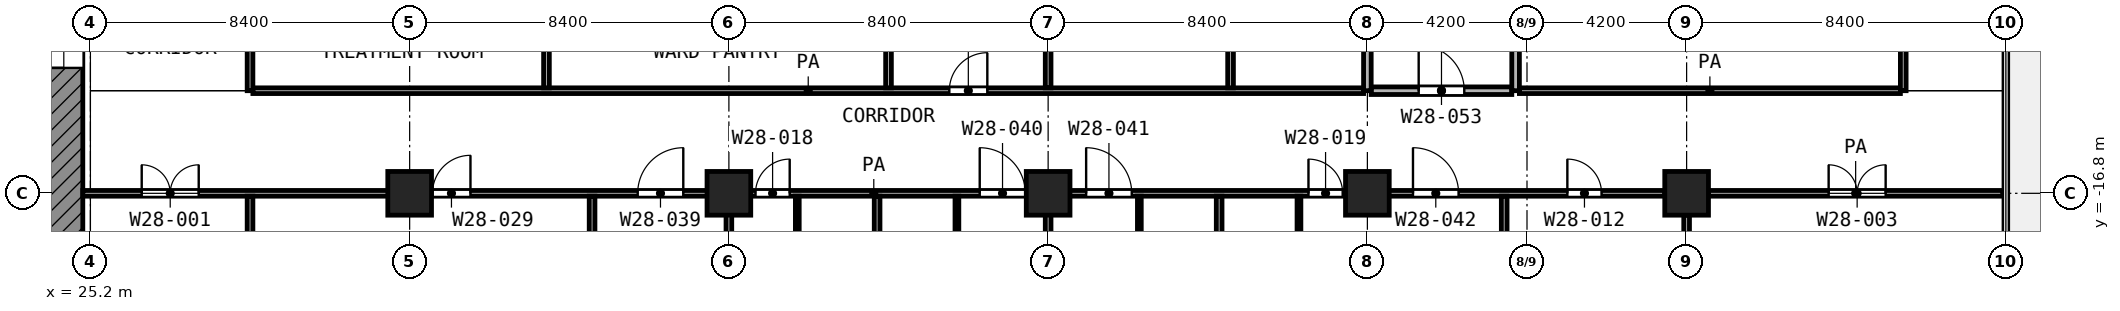
"""IFC4 building model, lengths in metres.
Left out: names, types, materials, properties, quantities, classifications, styles, units other than length and angle.
Written with IfcOpenShell. Run it as: python <this file> out.ifc"""

import sys

from ifc_helpers import new_model, si_unit, direction, frame, frame_2d, origin, origin_2d, place, context, subcontext, project, spatial, rectangle, extrude, element, fill, save


model = new_model("IFC4")
c1 = context("Model", 3, precision=1e-05, world=origin(), true_north=direction((0.0, 1.0)))
c2 = subcontext(c1, "Body", "Model", "MODEL_VIEW")
j1 = project(units=[si_unit("LENGTHUNIT", "METRE"), si_unit("PLANEANGLEUNIT", "RADIAN")], contexts=[c1])
p1 = place(None, origin())
s1 = spatial("IfcSite", under=j1, at=p1, CompositionType="ELEMENT")
p2 = place(p1, origin())
s2 = spatial("IfcBuilding", under=s1, at=p2, CompositionType="ELEMENT")
p3 = place(p2, frame((0.0, 0.0, 145.0)))
s3 = spatial("IfcBuildingStorey", under=s2, at=p3, CompositionType="ELEMENT", Elevation=145.0)
for number, where, z_axis, x_axis in (
    (1, (33.6, -16.8, 0.0), (0.0, 0.0, 1.0), (1.0, 0.0, 0.0)),
    (2, (42.0, -16.8, 0.0), (0.0, 0.0, 1.0), (1.0, 0.0, 0.0)),
    (3, (50.4, -16.8, 0.0), (0.0, 0.0, 1.0), (1.0, 0.0, 0.0)),
    (4, (58.8, -16.8, 0.0), (0.0, 0.0, 1.0), (1.0, 0.0, 0.0)),
    (5, (67.2, -16.8, 0.0), (0.0, 0.0, 1.0), (1.0, 0.0, 0.0)),
):
    element("IfcColumn", number, at=place(p3, frame(where, z_axis=z_axis, x_axis=x_axis)), inside=s3, PredefinedType="COLUMN", context=c2, shape_type="SweptSolid", body=[
        extrude(rectangle(XDim=1.15, YDim=1.15, at=origin_2d()), origin(), (0.0, 0.0, 1.0), 4.2),
    ])
p4 = place(p3, frame((24.5, -24.0, 0.0), z_axis=(0.0, 0.0, 1.0), x_axis=(0.0, 1.0, 0.0)))
e6 = element("IfcWall", 6, at=p4, inside=s3, PredefinedType="SHEAR", context=c2, shape_type="SweptSolid", body=[
    extrude(rectangle(XDim=18.6, YDim=1.0, at=frame_2d((9.3, 0.0))), origin(), (0.0, 0.0, 1.0), 3.6),
])
p5 = place(p4, frame((10.5, 0.0, 0.0)))
e7 = element("IfcOpeningElement", 7, at=p5, cuts=e6, PredefinedType="OPENING", context=c2, shape_type="SweptSolid", body=[
    extrude(rectangle(XDim=1.8, YDim=2.1, at=frame_2d((0.9, 1.05))), frame((0.0, 0.51, 0.0), z_axis=(0.0, -1.0, 0.0), x_axis=(1.0, 0.0, 0.0)), (0.0, 0.0, 1.0), 1.02),
])
for number, where, z_axis, x_axis in (
    (8, (43.8, -19.5, 0.0), (0.0, 0.0, 1.0), (0.0, 1.0, 0.0)),
    (9, (48.0, -19.5, 0.0), (0.0, 0.0, 1.0), (0.0, 1.0, 0.0)),
    (10, (52.8, -19.5, 0.0), (0.0, 0.0, 1.0), (0.0, 1.0, 0.0)),
):
    element("IfcWall", number, at=place(p3, frame(where, z_axis=z_axis, x_axis=x_axis)), inside=s3, PredefinedType="PARTITIONING", context=c2, shape_type="SweptSolid", body=[
        extrude(rectangle(XDim=2.625, YDim=0.1, at=frame_2d((1.312, 0.0))), origin(), (0.0, 0.0, 1.0), 3.6),
    ])
p6 = place(p3, frame((57.0, -19.499, 0.0), z_axis=(0.0, 0.0, 1.0), x_axis=(0.0, 1.0, 0.0)))
e11 = element("IfcWall", 11, at=p6, inside=s3, PredefinedType="PARTITIONING", context=c2, shape_type="SweptSolid", body=[
    extrude(rectangle(XDim=2.624, YDim=0.1, at=frame_2d((1.312, 0.0))), origin(), (0.0, 0.0, 1.0), 3.6),
])
p7 = place(p3, frame((25.0, -16.8, 0.0), z_axis=(0.0, 0.0, 1.0), x_axis=(1.0, 0.0, 0.0)))
e12 = element("IfcWall", 12, at=p7, inside=s3, PredefinedType="PARTITIONING", context=c2, shape_type="SweptSolid", body=[
    extrude(rectangle(XDim=41.625, YDim=0.15, at=frame_2d((20.812, 0.0))), origin(), (0.0, 0.0, 1.0), 3.6),
])
p8 = place(p7, frame((1.55, 0.0, 0.0)))
e13 = element("IfcOpeningElement", 13, at=p8, cuts=e12, PredefinedType="OPENING", context=c2, shape_type="SweptSolid", body=[
    extrude(rectangle(XDim=1.5, YDim=2.1, at=frame_2d((0.75, 1.05))), frame((0.0, 0.085, 0.0), z_axis=(0.0, -1.0, 0.0), x_axis=(1.0, 0.0, 0.0)), (0.0, 0.0, 1.0), 0.17),
])
p9 = place(p7, frame((9.2, 0.0, 0.0)))
e14 = element("IfcOpeningElement", 14, at=p9, cuts=e12, PredefinedType="OPENING", context=c2, shape_type="SweptSolid", body=[
    extrude(rectangle(XDim=1.0, YDim=2.1, at=frame_2d((0.5, 1.05))), frame((0.0, 0.085, 0.0), z_axis=(0.0, -1.0, 0.0), x_axis=(1.0, 0.0, 0.0)), (0.0, 0.0, 1.0), 0.17),
])
p10 = place(p7, frame((14.6, 0.0, 0.0)))
e15 = element("IfcOpeningElement", 15, at=p10, cuts=e12, PredefinedType="OPENING", context=c2, shape_type="SweptSolid", body=[
    extrude(rectangle(XDim=1.2, YDim=2.1, at=frame_2d((0.6, 1.05))), frame((0.0, 0.085, 0.0), z_axis=(0.0, -1.0, 0.0), x_axis=(1.0, 0.0, 0.0)), (0.0, 0.0, 1.0), 0.17),
])
p11 = place(p7, frame((17.7, 0.0, 0.0)))
e16 = element("IfcOpeningElement", 16, at=p11, cuts=e12, PredefinedType="OPENING", context=c2, shape_type="SweptSolid", body=[
    extrude(rectangle(XDim=0.9, YDim=2.1, at=frame_2d((0.45, 1.05))), frame((0.0, 0.085, 0.0), z_axis=(0.0, -1.0, 0.0), x_axis=(1.0, 0.0, 0.0)), (0.0, 0.0, 1.0), 0.17),
])
p12 = place(p7, frame((23.6, 0.0, 0.0)))
e17 = element("IfcOpeningElement", 17, at=p12, cuts=e12, PredefinedType="OPENING", context=c2, shape_type="SweptSolid", body=[
    extrude(rectangle(XDim=1.2, YDim=2.1, at=frame_2d((0.6, 1.05))), frame((0.0, 0.085, 0.0), z_axis=(0.0, -1.0, 0.0), x_axis=(1.0, 0.0, 0.0)), (0.0, 0.0, 1.0), 0.17),
])
p13 = place(p7, frame((26.4, 0.0, 0.0)))
e18 = element("IfcOpeningElement", 18, at=p13, cuts=e12, PredefinedType="OPENING", context=c2, shape_type="SweptSolid", body=[
    extrude(rectangle(XDim=1.2, YDim=2.1, at=frame_2d((0.6, 1.05))), frame((0.0, 0.085, 0.0), z_axis=(0.0, -1.0, 0.0), x_axis=(1.0, 0.0, 0.0)), (0.0, 0.0, 1.0), 0.17),
])
p14 = place(p7, frame((35.0, 0.0, 0.0)))
e19 = element("IfcOpeningElement", 19, at=p14, cuts=e12, PredefinedType="OPENING", context=c2, shape_type="SweptSolid", body=[
    extrude(rectangle(XDim=1.2, YDim=2.1, at=frame_2d((0.6, 1.05))), frame((0.0, 0.085, 0.0), z_axis=(0.0, -1.0, 0.0), x_axis=(1.0, 0.0, 0.0)), (0.0, 0.0, 1.0), 0.17),
])
p15 = place(p7, frame((32.25, 0.0, 0.0)))
e20 = element("IfcOpeningElement", 20, at=p15, cuts=e12, PredefinedType="OPENING", context=c2, shape_type="SweptSolid", body=[
    extrude(rectangle(XDim=0.9, YDim=2.1, at=frame_2d((0.45, 1.05))), frame((0.0, 0.085, 0.0), z_axis=(0.0, -1.0, 0.0), x_axis=(1.0, 0.0, 0.0)), (0.0, 0.0, 1.0), 0.17),
])
p16 = place(p7, frame((39.062, 0.0, 0.0)))
e21 = element("IfcOpeningElement", 21, at=p16, cuts=e12, PredefinedType="OPENING", context=c2, shape_type="SweptSolid", body=[
    extrude(rectangle(XDim=0.9, YDim=2.1, at=frame_2d((0.45, 1.05))), frame((0.0, 0.085, 0.0), z_axis=(0.0, -1.0, 0.0), x_axis=(1.0, 0.0, 0.0)), (0.0, 0.0, 1.0), 0.17),
])
p17 = place(p3, frame((67.775, -16.8, 0.0), z_axis=(0.0, 0.0, 1.0), x_axis=(1.0, 0.0, 0.0)))
e22 = element("IfcWall", 22, at=p17, inside=s3, PredefinedType="PARTITIONING", context=c2, shape_type="SweptSolid", body=[
    extrude(rectangle(XDim=7.745, YDim=0.15, at=frame_2d((3.873, 0.0))), origin(), (0.0, 0.0, 1.0), 3.6),
])
p18 = place(p17, frame((3.162, 0.0, 0.0)))
e23 = element("IfcOpeningElement", 23, at=p18, cuts=e22, PredefinedType="OPENING", context=c2, shape_type="SweptSolid", body=[
    extrude(rectangle(XDim=1.5, YDim=2.1, at=frame_2d((0.75, 1.05))), frame((0.0, 0.085, 0.0), z_axis=(0.0, -1.0, 0.0), x_axis=(1.0, 0.0, 0.0)), (0.0, 0.0, 1.0), 0.17),
])
p19 = place(p3, frame((29.475, -14.1, 0.0), z_axis=(0.0, 0.0, 1.0), x_axis=(1.0, 0.0, 0.0)))
e24 = element("IfcWall", 24, at=p19, inside=s3, PredefinedType="PARTITIONING", context=c2, shape_type="SweptSolid", body=[
    extrude(rectangle(XDim=29.225, YDim=0.15, at=frame_2d((14.612, 0.0))), origin(), (0.0, 0.0, 1.0), 3.6),
])
p20 = place(p19, frame((18.325, 0.0, 0.0)))
e25 = element("IfcOpeningElement", 25, at=p20, cuts=e24, PredefinedType="OPENING", context=c2, shape_type="SweptSolid", body=[
    extrude(rectangle(XDim=1.0, YDim=2.1, at=frame_2d((0.5, 1.05))), frame((0.0, 0.085, 0.0), z_axis=(0.0, -1.0, 0.0), x_axis=(1.0, 0.0, 0.0)), (0.0, 0.0, 1.0), 0.17),
])
p21 = place(p3, frame((62.8, -14.1, 0.0), z_axis=(0.0, 0.0, 1.0), x_axis=(1.0, 0.0, 0.0)))
e26 = element("IfcWall", 26, at=p21, inside=s3, PredefinedType="PARTITIONING", context=c2, shape_type="SweptSolid", body=[
    extrude(rectangle(XDim=10.025, YDim=0.15, at=frame_2d((5.012, 0.0))), origin(), (0.0, 0.0, 1.0), 3.6),
])
p22 = place(p3, frame((29.4, -25.2, 0.0), z_axis=(0.0, 0.0, 1.0), x_axis=(0.0, 1.0, 0.0)))
e27 = element("IfcWall", 27, at=p22, inside=s3, PredefinedType="PARTITIONING", context=c2, shape_type="SweptSolid", body=[
    extrude(rectangle(XDim=8.325, YDim=0.15, at=frame_2d((4.163, 0.0))), origin(), (0.0, 0.0, 1.0), 3.6),
])
p23 = place(p3, frame((29.4, -14.1, 0.0), z_axis=(0.0, 0.0, 1.0), x_axis=(0.0, 1.0, 0.0)))
e28 = element("IfcWall", 28, at=p23, inside=s3, PredefinedType="PARTITIONING", context=c2, shape_type="SweptSolid", body=[
    extrude(rectangle(XDim=3.0, YDim=0.15, at=frame_2d((1.5, 0.0))), origin(), (0.0, 0.0, 1.0), 3.6),
])
p24 = place(p3, frame((37.2, -14.025, 0.0), z_axis=(0.0, 0.0, 1.0), x_axis=(0.0, 1.0, 0.0)))
e29 = element("IfcWall", 29, at=p24, inside=s3, PredefinedType="PARTITIONING", context=c2, shape_type="SweptSolid", body=[
    extrude(rectangle(XDim=2.85, YDim=0.15, at=frame_2d((1.425, 0.0))), origin(), (0.0, 0.0, 1.0), 3.6),
])
p25 = place(p3, frame((38.4, -25.12, 0.0), z_axis=(0.0, 0.0, 1.0), x_axis=(0.0, 1.0, 0.0)))
e30 = element("IfcWall", 30, at=p25, inside=s3, PredefinedType="PARTITIONING", context=c2, shape_type="SweptSolid", body=[
    extrude(rectangle(XDim=8.245, YDim=0.15, at=frame_2d((4.123, 0.0))), origin(), (0.0, 0.0, 1.0), 2.7),
])
p26 = place(p3, frame((42.0, -25.12, 0.0), z_axis=(0.0, 0.0, 1.0), x_axis=(0.0, 1.0, 0.0)))
e31 = element("IfcWall", 31, at=p26, inside=s3, PredefinedType="PARTITIONING", context=c2, shape_type="SweptSolid", body=[
    extrude(rectangle(XDim=8.245, YDim=0.15, at=frame_2d((4.123, 0.0))), origin(), (0.0, 0.0, 1.0), 3.6),
])
p27 = place(p3, frame((45.9, -25.12, 0.0), z_axis=(0.0, 0.0, 1.0), x_axis=(0.0, 1.0, 0.0)))
e32 = element("IfcWall", 32, at=p27, inside=s3, PredefinedType="PARTITIONING", context=c2, shape_type="SweptSolid", body=[
    extrude(rectangle(XDim=8.245, YDim=0.15, at=frame_2d((4.123, 0.0))), origin(), (0.0, 0.0, 1.0), 2.7),
])
p28 = place(p3, frame((46.2, -14.025, 0.0), z_axis=(0.0, 0.0, 1.0), x_axis=(0.0, 1.0, 0.0)))
e33 = element("IfcWall", 33, at=p28, inside=s3, PredefinedType="PARTITIONING", context=c2, shape_type="SweptSolid", body=[
    extrude(rectangle(XDim=2.85, YDim=0.15, at=frame_2d((1.425, 0.0))), origin(), (0.0, 0.0, 1.0), 3.6),
])
p29 = place(p3, frame((50.4, -25.12, 0.0), z_axis=(0.0, 0.0, 1.0), x_axis=(0.0, 1.0, 0.0)))
e34 = element("IfcWall", 34, at=p29, inside=s3, PredefinedType="PARTITIONING", context=c2, shape_type="SweptSolid", body=[
    extrude(rectangle(XDim=8.245, YDim=0.15, at=frame_2d((4.123, 0.0))), origin(), (0.0, 0.0, 1.0), 3.6),
])
p30 = place(p3, frame((50.4, -14.025, 0.0), z_axis=(0.0, 0.0, 1.0), x_axis=(0.0, 1.0, 0.0)))
e35 = element("IfcWall", 35, at=p30, inside=s3, PredefinedType="PARTITIONING", context=c2, shape_type="SweptSolid", body=[
    extrude(rectangle(XDim=2.85, YDim=0.15, at=frame_2d((1.425, 0.0))), origin(), (0.0, 0.0, 1.0), 3.6),
])
p31 = place(p3, frame((54.9, -25.12, 0.0), z_axis=(0.0, 0.0, 1.0), x_axis=(0.0, 1.0, 0.0)))
e36 = element("IfcWall", 36, at=p31, inside=s3, PredefinedType="PARTITIONING", context=c2, shape_type="SweptSolid", body=[
    extrude(rectangle(XDim=8.245, YDim=0.15, at=frame_2d((4.123, 0.0))), origin(), (0.0, 0.0, 1.0), 2.7),
])
p32 = place(p3, frame((55.2, -14.025, 0.0), z_axis=(0.0, 0.0, 1.0), x_axis=(0.0, 1.0, 0.0)))
e37 = element("IfcWall", 37, at=p32, inside=s3, PredefinedType="PARTITIONING", context=c2, shape_type="SweptSolid", body=[
    extrude(rectangle(XDim=2.85, YDim=0.15, at=frame_2d((1.425, 0.0))), origin(), (0.0, 0.0, 1.0), 3.6),
])
p33 = place(p3, frame((62.4, -25.12, 0.0), z_axis=(0.0, 0.0, 1.0), x_axis=(0.0, 1.0, 0.0)))
e38 = element("IfcWall", 38, at=p33, inside=s3, PredefinedType="PARTITIONING", context=c2, shape_type="SweptSolid", body=[
    extrude(rectangle(XDim=8.245, YDim=0.15, at=frame_2d((4.123, 0.0))), origin(), (0.0, 0.0, 1.0), 2.7),
])
p34 = place(p3, frame((67.2, -25.12, 0.0), z_axis=(0.0, 0.0, 1.0), x_axis=(0.0, 1.0, 0.0)))
e39 = element("IfcWall", 39, at=p34, inside=s3, PredefinedType="PARTITIONING", context=c2, shape_type="SweptSolid", body=[
    extrude(rectangle(XDim=7.745, YDim=0.15, at=frame_2d((3.873, 0.0))), origin(), (0.0, 0.0, 1.0), 2.7),
])
p35 = place(p3, frame((72.9, -14.1, 0.0), z_axis=(0.0, 0.0, 1.0), x_axis=(0.0, 1.0, 0.0)))
e40 = element("IfcWall", 40, at=p35, inside=s3, PredefinedType="PARTITIONING", context=c2, shape_type="SweptSolid", body=[
    extrude(rectangle(XDim=3.0, YDim=0.15, at=frame_2d((1.5, 0.0))), origin(), (0.0, 0.0, 1.0), 3.6),
])
p36 = place(p3, frame((58.9, -14.1, 0.0), z_axis=(0.0, 0.0, 1.0), x_axis=(1.0, 0.0, 0.0)))
e41 = element("IfcWall", 41, at=p36, inside=s3, PredefinedType="PARTITIONING", context=c2, shape_type="SweptSolid", body=[
    extrude(rectangle(XDim=3.7, YDim=0.2, at=frame_2d((1.85, 0.0))), origin(), (0.0, 0.0, 1.0), 3.6),
])
p37 = place(p36, frame((1.25, 0.0, 0.0)))
e42 = element("IfcOpeningElement", 42, at=p37, cuts=e41, PredefinedType="OPENING", context=c2, shape_type="SweptSolid", body=[
    extrude(rectangle(XDim=1.2, YDim=2.1, at=frame_2d((0.6, 1.05))), frame((0.0, 0.11, 0.0), z_axis=(0.0, -1.0, 0.0), x_axis=(1.0, 0.0, 0.0)), (0.0, 0.0, 1.0), 0.22),
])
for number, where, z_axis, x_axis in (
    (43, (58.8, -14.1, 0.0), (0.0, 0.0, 1.0), (0.0, 1.0, 0.0)),
    (44, (62.7, -14.1, 0.0), (0.0, 0.0, 1.0), (0.0, 1.0, 0.0)),
):
    element("IfcWall", number, at=place(p3, frame(where, z_axis=z_axis, x_axis=x_axis)), inside=s3, PredefinedType="PARTITIONING", context=c2, shape_type="SweptSolid", body=[
        extrude(rectangle(XDim=3.0, YDim=0.2, at=frame_2d((1.5, 0.0))), origin(), (0.0, 0.0, 1.0), 3.6),
    ])
p38 = place(p5, origin())
e45 = element("IfcDoor", 45, at=p38, inside=s3, OperationType="DOUBLE_DOOR_SINGLE_SWING", PredefinedType="DOOR", context=c2, shape_type="SweptSolid", body=[
    extrude(rectangle(XDim=1.8, YDim=2.1, at=frame_2d((0.9, 1.05))), frame((0.0, 0.025, 0.0), z_axis=(0.0, -1.0, 0.0), x_axis=(1.0, 0.0, 0.0)), (0.0, 0.0, 1.0), 0.05),
])
fill(e7, e45)
p39 = place(p8, origin())
e46 = element("IfcDoor", 46, at=p39, inside=s3, OperationType="DOUBLE_DOOR_SINGLE_SWING", PredefinedType="DOOR", context=c2, shape_type="SweptSolid", body=[
    extrude(rectangle(XDim=1.5, YDim=2.1, at=frame_2d((0.75, 1.05))), frame((0.0, 0.025, 0.0), z_axis=(0.0, -1.0, 0.0), x_axis=(1.0, 0.0, 0.0)), (0.0, 0.0, 1.0), 0.05),
])
fill(e13, e46)
p40 = place(p20, origin())
e47 = element("IfcDoor", 47, at=p40, inside=s3, OperationType="SINGLE_SWING_RIGHT", PredefinedType="DOOR", context=c2, shape_type="SweptSolid", body=[
    extrude(rectangle(XDim=1.0, YDim=2.1, at=frame_2d((0.5, 1.05))), frame((0.0, 0.025, 0.0), z_axis=(0.0, -1.0, 0.0), x_axis=(1.0, 0.0, 0.0)), (0.0, 0.0, 1.0), 0.05),
])
fill(e25, e47)
p41 = place(p37, origin())
e48 = element("IfcDoor", 48, at=p41, inside=s3, OperationType="SINGLE_SWING_LEFT", PredefinedType="DOOR", context=c2, shape_type="SweptSolid", body=[
    extrude(rectangle(XDim=1.2, YDim=2.1, at=frame_2d((0.6, 1.05))), frame((0.0, 0.025, 0.0), z_axis=(0.0, -1.0, 0.0), x_axis=(1.0, 0.0, 0.0)), (0.0, 0.0, 1.0), 0.05),
])
fill(e42, e48)
p42 = place(p9, origin())
e49 = element("IfcDoor", 49, at=p42, inside=s3, OperationType="SINGLE_SWING_RIGHT", PredefinedType="DOOR", context=c2, shape_type="SweptSolid", body=[
    extrude(rectangle(XDim=1.0, YDim=2.1, at=frame_2d((0.5, 1.05))), frame((0.0, 0.025, 0.0), z_axis=(0.0, -1.0, 0.0), x_axis=(1.0, 0.0, 0.0)), (0.0, 0.0, 1.0), 0.05),
])
fill(e14, e49)
p43 = place(p10, origin())
e50 = element("IfcDoor", 50, at=p43, inside=s3, OperationType="SINGLE_SWING_RIGHT", PredefinedType="DOOR", context=c2, shape_type="SweptSolid", body=[
    extrude(rectangle(XDim=1.2, YDim=2.1, at=frame_2d((0.6, 1.05))), frame((0.0, 0.025, 0.0), z_axis=(0.0, -1.0, 0.0), x_axis=(1.0, 0.0, 0.0)), (0.0, 0.0, 1.0), 0.05),
])
fill(e15, e50)
p44 = place(p11, origin())
e51 = element("IfcDoor", 51, at=p44, inside=s3, OperationType="SINGLE_SWING_RIGHT", PredefinedType="DOOR", context=c2, shape_type="SweptSolid", body=[
    extrude(rectangle(XDim=0.9, YDim=2.1, at=frame_2d((0.45, 1.05))), frame((0.0, 0.025, 0.0), z_axis=(0.0, -1.0, 0.0), x_axis=(1.0, 0.0, 0.0)), (0.0, 0.0, 1.0), 0.05),
])
fill(e16, e51)
p45 = place(p12, origin())
e52 = element("IfcDoor", 52, at=p45, inside=s3, OperationType="SINGLE_SWING_LEFT", PredefinedType="DOOR", context=c2, shape_type="SweptSolid", body=[
    extrude(rectangle(XDim=1.2, YDim=2.1, at=frame_2d((0.6, 1.05))), frame((0.0, 0.025, 0.0), z_axis=(0.0, -1.0, 0.0), x_axis=(1.0, 0.0, 0.0)), (0.0, 0.0, 1.0), 0.05),
])
fill(e17, e52)
p46 = place(p13, origin())
e53 = element("IfcDoor", 53, at=p46, inside=s3, OperationType="SINGLE_SWING_LEFT", PredefinedType="DOOR", context=c2, shape_type="SweptSolid", body=[
    extrude(rectangle(XDim=1.2, YDim=2.1, at=frame_2d((0.6, 1.05))), frame((0.0, 0.025, 0.0), z_axis=(0.0, -1.0, 0.0), x_axis=(1.0, 0.0, 0.0)), (0.0, 0.0, 1.0), 0.05),
])
fill(e18, e53)
p47 = place(p14, origin())
e54 = element("IfcDoor", 54, at=p47, inside=s3, OperationType="SINGLE_SWING_LEFT", PredefinedType="DOOR", context=c2, shape_type="SweptSolid", body=[
    extrude(rectangle(XDim=1.2, YDim=2.1, at=frame_2d((0.6, 1.05))), frame((0.0, 0.025, 0.0), z_axis=(0.0, -1.0, 0.0), x_axis=(1.0, 0.0, 0.0)), (0.0, 0.0, 1.0), 0.05),
])
fill(e19, e54)
p48 = place(p15, origin())
e55 = element("IfcDoor", 55, at=p48, inside=s3, OperationType="SINGLE_SWING_LEFT", PredefinedType="DOOR", context=c2, shape_type="SweptSolid", body=[
    extrude(rectangle(XDim=0.9, YDim=2.1, at=frame_2d((0.45, 1.05))), frame((0.0, 0.025, 0.0), z_axis=(0.0, -1.0, 0.0), x_axis=(1.0, 0.0, 0.0)), (0.0, 0.0, 1.0), 0.05),
])
fill(e20, e55)
p49 = place(p16, origin())
e56 = element("IfcDoor", 56, at=p49, inside=s3, OperationType="SINGLE_SWING_LEFT", PredefinedType="DOOR", context=c2, shape_type="SweptSolid", body=[
    extrude(rectangle(XDim=0.9, YDim=2.1, at=frame_2d((0.45, 1.05))), frame((0.0, 0.025, 0.0), z_axis=(0.0, -1.0, 0.0), x_axis=(1.0, 0.0, 0.0)), (0.0, 0.0, 1.0), 0.05),
])
fill(e21, e56)
p50 = place(p18, origin())
e57 = element("IfcDoor", 57, at=p50, inside=s3, OperationType="DOUBLE_DOOR_SINGLE_SWING", PredefinedType="DOOR", context=c2, shape_type="SweptSolid", body=[
    extrude(rectangle(XDim=1.5, YDim=2.1, at=frame_2d((0.75, 1.05))), frame((0.0, 0.025, 0.0), z_axis=(0.0, -1.0, 0.0), x_axis=(1.0, 0.0, 0.0)), (0.0, 0.0, 1.0), 0.05),
])
fill(e23, e57)
save(model, sys.argv[1])
